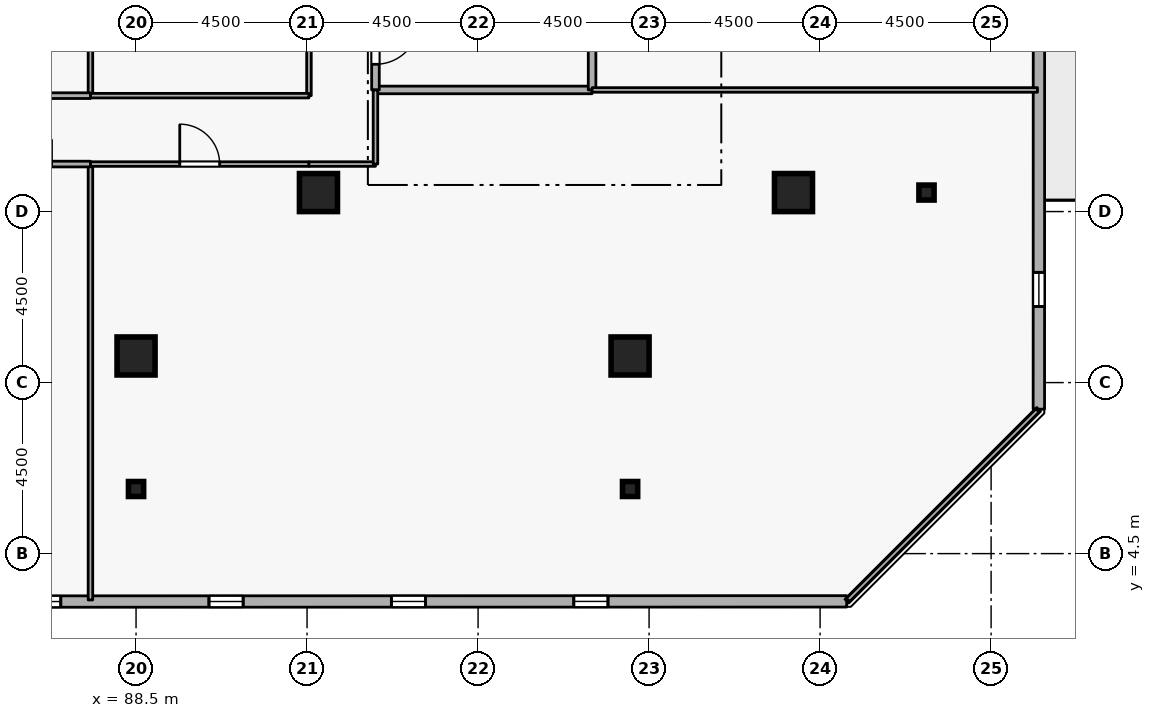
"""IFC4 building model, lengths in metres.
Left out: names, types, materials, properties, quantities, classifications, styles, units other than length and angle.
Written with IfcOpenShell. Run it as: python <this file> out.ifc"""

import sys

from ifc_helpers import new_model, si_unit, direction, frame, frame_2d, origin, origin_2d, place, context, subcontext, project, spatial, rectangle, i_section, extrude, element, fill, save


model = new_model("IFC4")
c1 = context("Model", 3, precision=1e-05, world=origin(), true_north=direction((0.0, 1.0)))
c2 = subcontext(c1, "Body", "Model", "MODEL_VIEW")
j1 = project(units=[si_unit("LENGTHUNIT", "METRE"), si_unit("PLANEANGLEUNIT", "RADIAN")], contexts=[c1])
p1 = place(None, origin())
s1 = spatial("IfcSite", under=j1, at=p1, CompositionType="ELEMENT")
p2 = place(p1, origin())
s2 = spatial("IfcBuilding", under=s1, at=p2, CompositionType="ELEMENT")
p3 = place(p2, frame((0.0, 0.0, 243.9)))
s3 = spatial("IfcBuildingStorey", under=s2, at=p3, CompositionType="ELEMENT", Elevation=243.9)
for number, where, z_axis, x_axis in (
    (1, (105.8, 14.0, 0.0), (0.0, 0.0, 1.0), (1.0, 0.0, 0.0)),
    (2, (101.5, 9.7, 0.0), (0.0, 0.0, 1.0), (1.0, 0.0, 0.0)),
    (3, (88.5, 9.7, 0.0), (0.0, 0.0, 1.0), (1.0, 0.0, 0.0)),
    (4, (93.3, 14.0, 0.0), (0.0, 0.0, 1.0), (1.0, 0.0, 0.0)),
):
    element("IfcColumn", number, at=place(p3, frame(where, z_axis=z_axis, x_axis=x_axis)), inside=s3, PredefinedType="COLUMN", context=c2, shape_type="SweptSolid", body=[
        extrude(rectangle(XDim=1.0, YDim=1.0, at=origin_2d()), origin(), (0.0, 0.0, 1.0), 3.6),
    ])
for number, where, z_axis, x_axis in (
    (5, (109.3, 14.0, 0.0), (0.0, 0.0, 1.0), (1.0, 0.0, 0.0)),
    (6, (101.5, 6.2, 0.0), (0.0, 0.0, 1.0), (1.0, 0.0, 0.0)),
    (7, (88.5, 6.2, 0.0), (0.0, 0.0, 1.0), (1.0, 0.0, 0.0)),
):
    element("IfcColumn", number, at=place(p3, frame(where, z_axis=z_axis, x_axis=x_axis)), inside=s3, PredefinedType="COLUMN", context=c2, shape_type="SweptSolid", body=[
        extrude(i_section(OverallWidth=0.399, OverallDepth=0.394, WebThickness=0.023, FlangeThickness=0.037, FilletRadius=0.015, at=origin_2d()), origin(), (0.0, 0.0, 1.0), 3.6),
    ])
p4 = place(p3, frame((73.319, 3.235, 0.0), z_axis=(0.0, 0.0, 1.0), x_axis=(0.999999969988, 0.000244999128, 0.0)))
e8 = element("IfcWall", 8, at=p4, inside=s3, PredefinedType="STANDARD", context=c2, shape_type="SweptSolid", body=[
    extrude(rectangle(XDim=33.881, YDim=0.3, at=frame_2d((16.94, 0.0))), origin(), (0.0, 0.0, 1.0), 2.7),
])
p5 = place(p4, frame((2.7, 0.0, 0.72)))
e9 = element("IfcOpeningElement", 9, at=p5, cuts=e8, PredefinedType="OPENING", context=c2, shape_type="SweptSolid", body=[
    extrude(rectangle(XDim=0.9, YDim=1.75, at=frame_2d((0.45, 0.875))), frame((0.0, 0.16, 0.0), z_axis=(0.0, -1.0, 0.0), x_axis=(1.0, 0.0, 0.0)), (0.0, 0.0, 1.0), 0.32),
])
p6 = place(p4, frame((7.5, 0.0, 0.72)))
e10 = element("IfcOpeningElement", 10, at=p6, cuts=e8, PredefinedType="OPENING", context=c2, shape_type="SweptSolid", body=[
    extrude(rectangle(XDim=0.9, YDim=1.75, at=frame_2d((0.45, 0.875))), frame((0.0, 0.16, 0.0), z_axis=(0.0, -1.0, 0.0), x_axis=(1.0, 0.0, 0.0)), (0.0, 0.0, 1.0), 0.32),
])
p7 = place(p4, frame((12.3, 0.0, 0.72)))
e11 = element("IfcOpeningElement", 11, at=p7, cuts=e8, PredefinedType="OPENING", context=c2, shape_type="SweptSolid", body=[
    extrude(rectangle(XDim=0.9, YDim=1.75, at=frame_2d((0.45, 0.875))), frame((0.0, 0.16, 0.0), z_axis=(0.0, -1.0, 0.0), x_axis=(1.0, 0.0, 0.0)), (0.0, 0.0, 1.0), 0.32),
])
p8 = place(p4, frame((17.1, 0.0, 0.72)))
e12 = element("IfcOpeningElement", 12, at=p8, cuts=e8, PredefinedType="OPENING", context=c2, shape_type="SweptSolid", body=[
    extrude(rectangle(XDim=0.9, YDim=1.75, at=frame_2d((0.45, 0.875))), frame((0.0, 0.16, 0.0), z_axis=(0.0, -1.0, 0.0), x_axis=(1.0, 0.0, 0.0)), (0.0, 0.0, 1.0), 0.32),
])
p9 = place(p4, frame((21.9, 0.0, 0.72)))
e13 = element("IfcOpeningElement", 13, at=p9, cuts=e8, PredefinedType="OPENING", context=c2, shape_type="SweptSolid", body=[
    extrude(rectangle(XDim=0.9, YDim=1.75, at=frame_2d((0.45, 0.875))), frame((0.0, 0.16, 0.0), z_axis=(0.0, -1.0, 0.0), x_axis=(1.0, 0.0, 0.0)), (0.0, 0.0, 1.0), 0.32),
])
p10 = place(p4, frame((26.7, 0.0, 0.72)))
e14 = element("IfcOpeningElement", 14, at=p10, cuts=e8, PredefinedType="OPENING", context=c2, shape_type="SweptSolid", body=[
    extrude(rectangle(XDim=0.9, YDim=1.75, at=frame_2d((0.45, 0.875))), frame((0.0, 0.16, 0.0), z_axis=(0.0, -1.0, 0.0), x_axis=(1.0, 0.0, 0.0)), (0.0, 0.0, 1.0), 0.32),
])
p11 = place(p3, frame((112.256, 8.301, 0.0), z_axis=(0.0, 0.0, 1.0), x_axis=(0.000244999128, 0.999999969988, 0.0)))
e15 = element("IfcWall", 15, at=p11, inside=s3, PredefinedType="STANDARD", context=c2, shape_type="SweptSolid", body=[
    extrude(rectangle(XDim=33.881, YDim=0.3, at=frame_2d((16.94, 0.0))), origin(), (0.0, 0.0, 1.0), 2.7),
])
p12 = place(p11, frame((26.84, 0.0, 0.0)))
e16 = element("IfcOpeningElement", 16, at=p12, cuts=e15, PredefinedType="OPENING", context=c2, shape_type="SweptSolid", body=[
    extrude(rectangle(XDim=1.0, YDim=2.08, at=frame_2d((0.5, 1.04))), frame((0.0, 0.16, 0.0), z_axis=(0.0, -1.0, 0.0), x_axis=(1.0, 0.0, 0.0)), (0.0, 0.0, 1.0), 0.32),
])
p13 = place(p11, frame((2.7, 0.0, 0.72)))
e17 = element("IfcOpeningElement", 17, at=p13, cuts=e15, PredefinedType="OPENING", context=c2, shape_type="SweptSolid", body=[
    extrude(rectangle(XDim=0.9, YDim=1.75, at=frame_2d((0.45, 0.875))), frame((0.0, 0.16, 0.0), z_axis=(0.0, -1.0, 0.0), x_axis=(1.0, 0.0, 0.0)), (0.0, 0.0, 1.0), 0.32),
])
p14 = place(p11, frame((12.3, 0.0, 0.72)))
e18 = element("IfcOpeningElement", 18, at=p14, cuts=e15, PredefinedType="OPENING", context=c2, shape_type="SweptSolid", body=[
    extrude(rectangle(XDim=0.9, YDim=1.75, at=frame_2d((0.45, 0.875))), frame((0.0, 0.16, 0.0), z_axis=(0.0, -1.0, 0.0), x_axis=(1.0, 0.0, 0.0)), (0.0, 0.0, 1.0), 0.32),
])
p15 = place(p11, frame((17.1, 0.0, 0.72)))
e19 = element("IfcOpeningElement", 19, at=p15, cuts=e15, PredefinedType="OPENING", context=c2, shape_type="SweptSolid", body=[
    extrude(rectangle(XDim=0.9, YDim=1.75, at=frame_2d((0.45, 0.875))), frame((0.0, 0.16, 0.0), z_axis=(0.0, -1.0, 0.0), x_axis=(1.0, 0.0, 0.0)), (0.0, 0.0, 1.0), 0.32),
])
p16 = place(p11, frame((21.9, 0.0, 0.72)))
e20 = element("IfcOpeningElement", 20, at=p16, cuts=e15, PredefinedType="OPENING", context=c2, shape_type="SweptSolid", body=[
    extrude(rectangle(XDim=0.9, YDim=1.75, at=frame_2d((0.45, 0.875))), frame((0.0, 0.16, 0.0), z_axis=(0.0, -1.0, 0.0), x_axis=(1.0, 0.0, 0.0)), (0.0, 0.0, 1.0), 0.32),
])
p17 = place(p3, frame((94.8, 16.7, 0.0), z_axis=(0.0, 0.0, 1.0), x_axis=(1.0, 0.0, 0.0)))
e21 = element("IfcWall", 21, at=p17, inside=s3, PredefinedType="STANDARD", context=c2, shape_type="SweptSolid", body=[
    extrude(rectangle(XDim=5.7, YDim=0.2, at=frame_2d((2.85, 0.0))), origin(), (0.0, 0.0, 1.0), 3.34),
])
p18 = place(p3, frame((100.5, 16.7, 0.0), z_axis=(0.0, 0.0, 1.0), x_axis=(0.0, 1.0, 0.0)))
e22 = element("IfcWall", 22, at=p18, inside=s3, PredefinedType="STANDARD", context=c2, shape_type="SweptSolid", body=[
    extrude(rectangle(XDim=2.5, YDim=0.2, at=frame_2d((1.25, 0.0))), origin(), (0.0, 0.0, 1.0), 3.34),
])
p19 = place(p3, frame((94.8, 19.2, 0.0), z_axis=(0.0, 0.0, 1.0), x_axis=(0.0, -1.0, 0.0)))
e23 = element("IfcWall", 23, at=p19, inside=s3, PredefinedType="STANDARD", context=c2, shape_type="SweptSolid", body=[
    extrude(rectangle(XDim=2.5, YDim=0.2, at=frame_2d((1.25, 0.0))), origin(), (0.0, 0.0, 1.0), 3.34),
])
p20 = place(p19, frame((0.675, 0.0, 0.0)))
e24 = element("IfcOpeningElement", 24, at=p20, cuts=e23, PredefinedType="OPENING", context=c2, shape_type="SweptSolid", body=[
    extrude(rectangle(XDim=1.15, YDim=2.1, at=frame_2d((0.575, 1.05))), frame((0.0, 0.11, 0.0), z_axis=(0.0, -1.0, 0.0), x_axis=(1.0, 0.0, 0.0)), (0.0, 0.0, 1.0), 0.22),
])
p21 = place(p3, frame((87.3, 3.28, 0.0), z_axis=(0.0, 0.0, 1.0), x_axis=(0.0, 1.0, 0.0)))
e25 = element("IfcWall", 25, at=p21, inside=s3, PredefinedType="PARTITIONING", context=c2, shape_type="SweptSolid", body=[
    extrude(rectangle(XDim=11.47, YDim=0.12, at=frame_2d((5.735, 0.0))), origin(), (0.0, 0.0, 1.0), 3.34),
])
p22 = place(p3, frame((87.3, 14.75, 0.0), z_axis=(0.0, 0.0, 1.0), x_axis=(1.0, 0.0, 0.0)))
e26 = element("IfcWall", 26, at=p22, inside=s3, PredefinedType="PARTITIONING", context=c2, shape_type="SweptSolid", body=[
    extrude(rectangle(XDim=5.75, YDim=0.12, at=frame_2d((2.875, 0.0))), origin(), (0.0, 0.0, 1.0), 3.34),
])
p23 = place(p22, frame((2.35, 0.0, 0.0)))
e27 = element("IfcOpeningElement", 27, at=p23, cuts=e26, PredefinedType="OPENING", context=c2, shape_type="SweptSolid", body=[
    extrude(rectangle(XDim=1.05, YDim=2.1, at=frame_2d((0.525, 1.05))), frame((0.0, 0.07, 0.0), z_axis=(0.0, -1.0, 0.0), x_axis=(1.0, 0.0, 0.0)), (0.0, 0.0, 1.0), 0.14),
])
p24 = place(p3, frame((93.05, 14.75, 0.0), z_axis=(0.0, 0.0, 1.0), x_axis=(1.0, 0.0, 0.0)))
e28 = element("IfcWall", 28, at=p24, inside=s3, PredefinedType="PARTITIONING", context=c2, shape_type="SweptSolid", body=[
    extrude(rectangle(XDim=1.75, YDim=0.12, at=frame_2d((0.875, 0.0))), origin(), (0.0, 0.0, 1.0), 3.34),
])
p25 = place(p3, frame((94.8, 14.75, 0.0), z_axis=(0.0, 0.0, 1.0), x_axis=(0.0, 1.0, 0.0)))
e29 = element("IfcWall", 29, at=p25, inside=s3, PredefinedType="PARTITIONING", context=c2, shape_type="SweptSolid", body=[
    extrude(rectangle(XDim=1.95, YDim=0.12, at=frame_2d((0.975, 0.0))), origin(), (0.0, 0.0, 1.0), 3.34),
])
p26 = place(p3, frame((100.5, 16.7, 0.0), z_axis=(0.0, 0.0, 1.0), x_axis=(1.0, 0.0, 0.0)))
e30 = element("IfcWall", 30, at=p26, inside=s3, PredefinedType="PARTITIONING", context=c2, shape_type="SweptSolid", body=[
    extrude(rectangle(XDim=11.72, YDim=0.12, at=frame_2d((5.86, 0.0))), origin(), (0.0, 0.0, 1.0), 3.34),
])
p27 = place(p3, frame((112.22, 8.267, 0.0), z_axis=(0.0, 0.0, 1.0), x_axis=(-0.707106781187, -0.707106781187, 0.0)))
e31 = element("IfcWall", 31, at=p27, inside=s3, PredefinedType="PARTITIONING", context=c2, shape_type="SweptSolid", body=[
    extrude(rectangle(XDim=7.052, YDim=0.12, at=frame_2d((3.526, 0.0))), origin(), (0.0, 0.0, 1.0), 3.34),
])
p28 = place(p3, frame((83.95, 14.75, 0.0), z_axis=(0.0, 0.0, 1.0), x_axis=(1.0, 0.0, 0.0)))
e32 = element("IfcWall", 32, at=p28, inside=s3, PredefinedType="PARTITIONING", context=c2, shape_type="SweptSolid", body=[
    extrude(rectangle(XDim=3.35, YDim=0.15, at=frame_2d((1.675, 0.0))), origin(), (0.0, 0.0, 1.0), 3.34),
])
p29 = place(p28, frame((1.025, 0.0, 0.0)))
e33 = element("IfcOpeningElement", 33, at=p29, cuts=e32, PredefinedType="OPENING", context=c2, shape_type="SweptSolid", body=[
    extrude(rectangle(XDim=1.3, YDim=2.12, at=frame_2d((0.65, 1.06))), frame((0.0, 0.085, 0.0), z_axis=(0.0, -1.0, 0.0), x_axis=(1.0, 0.0, 0.0)), (0.0, 0.0, 1.0), 0.17),
])
p30 = place(p3, frame((87.3, 16.55, 0.0), z_axis=(0.0, 0.0, 1.0), x_axis=(0.0, 1.0, 0.0)))
e34 = element("IfcWall", 34, at=p30, inside=s3, PredefinedType="PARTITIONING", context=c2, shape_type="SweptSolid", body=[
    extrude(rectangle(XDim=5.85, YDim=0.12, at=frame_2d((2.925, 0.0))), origin(), (0.0, 0.0, 1.0), 3.34),
])
p31 = place(p3, frame((93.05, 22.4, 0.0), z_axis=(0.0, 0.0, 1.0), x_axis=(0.0, -1.0, 0.0)))
e35 = element("IfcWall", 35, at=p31, inside=s3, PredefinedType="PARTITIONING", context=c2, shape_type="SweptSolid", body=[
    extrude(rectangle(XDim=5.85, YDim=0.12, at=frame_2d((2.925, 0.0))), origin(), (0.0, 0.0, 1.0), 3.34),
])
p32 = place(p31, frame((2.45, 0.0, 0.0)))
e36 = element("IfcOpeningElement", 36, at=p32, cuts=e35, PredefinedType="OPENING", context=c2, shape_type="SweptSolid", body=[
    extrude(rectangle(XDim=0.95, YDim=2.1, at=frame_2d((0.475, 1.05))), frame((0.0, 0.07, 0.0), z_axis=(0.0, -1.0, 0.0), x_axis=(1.0, 0.0, 0.0)), (0.0, 0.0, 1.0), 0.14),
])
p33 = place(p3, frame((93.05, 16.55, 0.0), z_axis=(0.0, 0.0, 1.0), x_axis=(-1.0, 0.0, 0.0)))
e37 = element("IfcWall", 37, at=p33, inside=s3, PredefinedType="PARTITIONING", context=c2, shape_type="SweptSolid", body=[
    extrude(rectangle(XDim=5.75, YDim=0.12, at=frame_2d((2.875, 0.0))), origin(), (0.0, 0.0, 1.0), 3.34),
])
p34 = place(p3, frame((87.3, 16.55, 0.0), z_axis=(0.0, 0.0, 1.0), x_axis=(-1.0, 0.0, 0.0)))
e38 = element("IfcWall", 38, at=p34, inside=s3, PredefinedType="PARTITIONING", context=c2, shape_type="SweptSolid", body=[
    extrude(rectangle(XDim=3.35, YDim=0.15, at=frame_2d((1.675, 0.0))), origin(), (0.0, 0.0, 1.0), 3.34),
])
p35 = place(p7, origin())
e39 = element("IfcWindow", 39, at=p35, inside=s3, PartitioningType="SINGLE_PANEL", PredefinedType="WINDOW", context=c2, shape_type="SweptSolid", body=[
    extrude(rectangle(XDim=0.9, YDim=1.75, at=frame_2d((0.45, 0.875))), frame((0.0, 0.03, 0.0), z_axis=(0.0, -1.0, 0.0), x_axis=(1.0, 0.0, 0.0)), (0.0, 0.0, 1.0), 0.06),
])
fill(e11, e39)
p36 = place(p8, origin())
e40 = element("IfcWindow", 40, at=p36, inside=s3, PartitioningType="SINGLE_PANEL", PredefinedType="WINDOW", context=c2, shape_type="SweptSolid", body=[
    extrude(rectangle(XDim=0.9, YDim=1.75, at=frame_2d((0.45, 0.875))), frame((0.0, 0.03, 0.0), z_axis=(0.0, -1.0, 0.0), x_axis=(1.0, 0.0, 0.0)), (0.0, 0.0, 1.0), 0.06),
])
fill(e12, e40)
p37 = place(p9, origin())
e41 = element("IfcWindow", 41, at=p37, inside=s3, PartitioningType="SINGLE_PANEL", PredefinedType="WINDOW", context=c2, shape_type="SweptSolid", body=[
    extrude(rectangle(XDim=0.9, YDim=1.75, at=frame_2d((0.45, 0.875))), frame((0.0, 0.03, 0.0), z_axis=(0.0, -1.0, 0.0), x_axis=(1.0, 0.0, 0.0)), (0.0, 0.0, 1.0), 0.06),
])
fill(e13, e41)
p38 = place(p10, origin())
e42 = element("IfcWindow", 42, at=p38, inside=s3, PartitioningType="SINGLE_PANEL", PredefinedType="WINDOW", context=c2, shape_type="SweptSolid", body=[
    extrude(rectangle(XDim=0.9, YDim=1.75, at=frame_2d((0.45, 0.875))), frame((0.0, 0.03, 0.0), z_axis=(0.0, -1.0, 0.0), x_axis=(1.0, 0.0, 0.0)), (0.0, 0.0, 1.0), 0.06),
])
fill(e14, e42)
p39 = place(p13, origin())
e43 = element("IfcWindow", 43, at=p39, inside=s3, PartitioningType="SINGLE_PANEL", PredefinedType="WINDOW", context=c2, shape_type="SweptSolid", body=[
    extrude(rectangle(XDim=0.9, YDim=1.75, at=frame_2d((0.45, 0.875))), frame((0.0, 0.03, 0.0), z_axis=(0.0, -1.0, 0.0), x_axis=(1.0, 0.0, 0.0)), (0.0, 0.0, 1.0), 0.06),
])
fill(e17, e43)
p40 = place(p20, origin())
e44 = element("IfcDoor", 44, at=p40, inside=s3, OperationType="SINGLE_SWING_LEFT", PredefinedType="DOOR", context=c2, shape_type="SweptSolid", body=[
    extrude(rectangle(XDim=1.15, YDim=2.1, at=frame_2d((0.575, 1.05))), frame((0.0, 0.025, 0.0), z_axis=(0.0, -1.0, 0.0), x_axis=(1.0, 0.0, 0.0)), (0.0, 0.0, 1.0), 0.05),
])
fill(e24, e44)
p41 = place(p23, origin())
e45 = element("IfcDoor", 45, at=p41, inside=s3, OperationType="SINGLE_SWING_LEFT", PredefinedType="DOOR", context=c2, shape_type="SweptSolid", body=[
    extrude(rectangle(XDim=1.05, YDim=2.1, at=frame_2d((0.525, 1.05))), frame((0.0, 0.025, 0.0), z_axis=(0.0, -1.0, 0.0), x_axis=(1.0, 0.0, 0.0)), (0.0, 0.0, 1.0), 0.05),
])
fill(e27, e45)
save(model, sys.argv[1])
